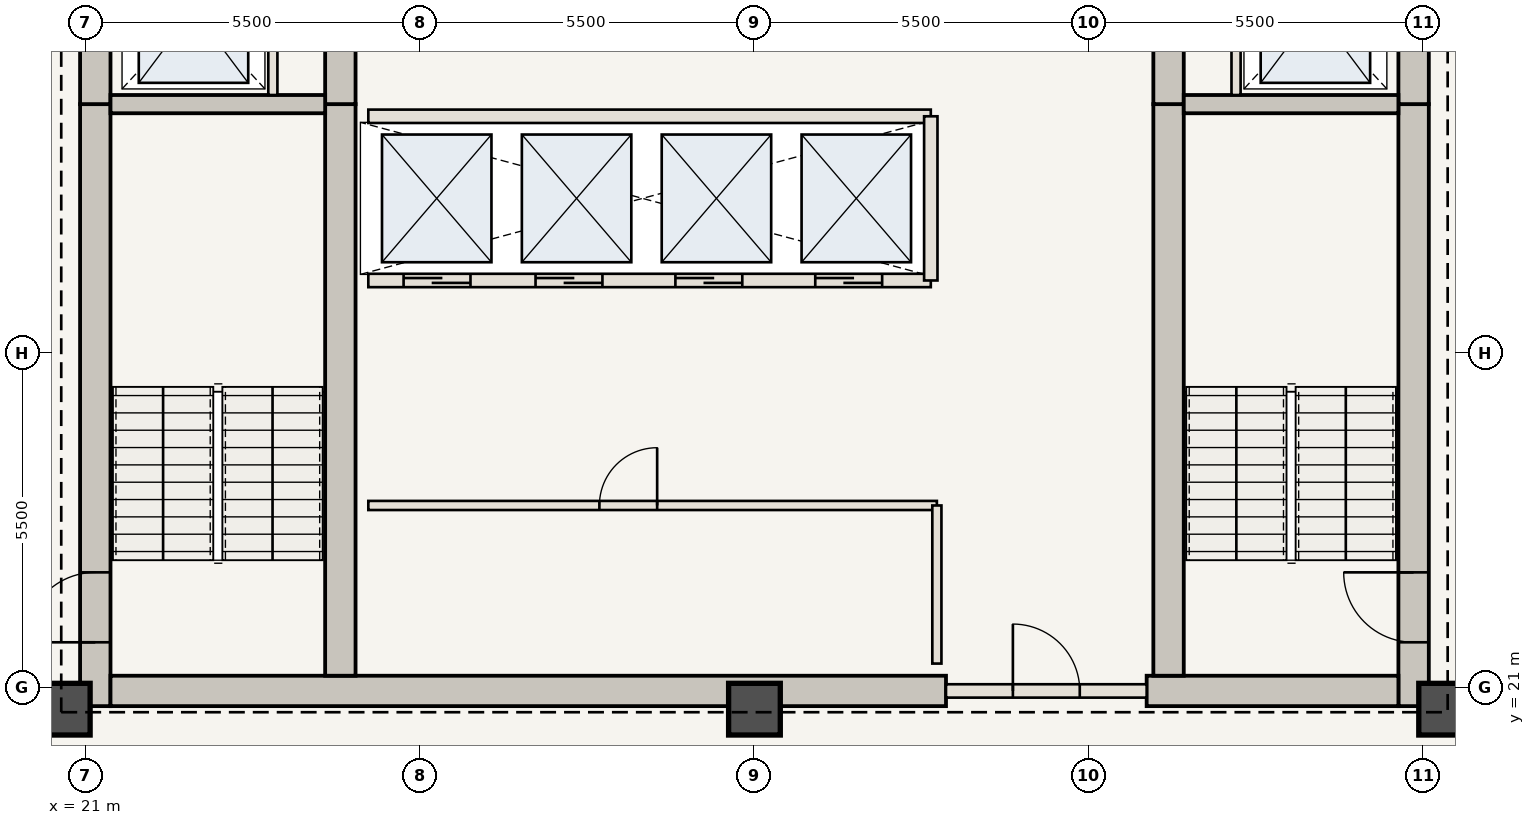
"""IFC4 building model, lengths in metres.
Left out: names, types, materials, properties, quantities, classifications, styles, units other than length and angle.
Written with IfcOpenShell. Run it as: python <this file> out.ifc"""

import sys

from ifc_helpers import new_model, si_unit, direction, frame, frame_2d, origin, origin_2d, place, context, subcontext, project, spatial, rectangle, extrude, element, fill, save


model = new_model("IFC4")
c1 = context("Model", 3, precision=1e-05, world=origin(), true_north=direction((0.0, 1.0)))
c2 = subcontext(c1, "Body", "Model", "MODEL_VIEW")
j1 = project(units=[si_unit("LENGTHUNIT", "METRE"), si_unit("PLANEANGLEUNIT", "RADIAN")], contexts=[c1])
p1 = place(None, origin())
s1 = spatial("IfcSite", under=j1, at=p1, CompositionType="ELEMENT")
p2 = place(p1, origin())
s2 = spatial("IfcBuilding", under=s1, at=p2, CompositionType="ELEMENT")
p3 = place(p2, frame((0.0, 0.0, 202.3)))
s3 = spatial("IfcBuildingStorey", under=s2, at=p3, CompositionType="ELEMENT", Elevation=202.3)
p4 = place(p3, frame((21.16, 20.7, 0.0), z_axis=(0.0, 0.0, 1.0), x_axis=(0.0, 1.0, 0.0)))
e1 = element("IfcWall", 1, at=p4, inside=s3, PredefinedType="SHEAR", context=c2, shape_type="SweptSolid", body=[
    extrude(rectangle(XDim=9.9, YDim=0.5, at=frame_2d((4.95, 0.0))), origin(), (0.0, 0.0, 1.0), 3.85),
])
p5 = place(p4, frame((1.05, 0.0, 0.0)))
e2 = element("IfcOpeningElement", 2, at=p5, cuts=e1, PredefinedType="OPENING", context=c2, shape_type="SweptSolid", body=[
    extrude(rectangle(XDim=1.15, YDim=2.15, at=frame_2d((0.575, 1.075))), frame((0.0, 0.26, 0.0), z_axis=(0.0, -1.0, 0.0), x_axis=(1.0, 0.0, 0.0)), (0.0, 0.0, 1.0), 0.52),
])
p6 = place(p3, frame((21.16, 30.6, 0.0), z_axis=(0.0, 0.0, 1.0), x_axis=(0.0, 1.0, 0.0)))
e3 = element("IfcWall", 3, at=p6, inside=s3, PredefinedType="SHEAR", context=c2, shape_type="SweptSolid", body=[
    extrude(rectangle(XDim=12.65, YDim=0.5, at=frame_2d((6.325, 0.0))), origin(), (0.0, 0.0, 1.0), 3.85),
])
p7 = place(p6, frame((4.2, 0.0, 0.0)))
e4 = element("IfcOpeningElement", 4, at=p7, cuts=e3, PredefinedType="OPENING", context=c2, shape_type="SweptSolid", body=[
    extrude(rectangle(XDim=1.1, YDim=2.15, at=frame_2d((0.55, 1.075))), frame((0.0, 0.26, 0.0), z_axis=(0.0, -1.0, 0.0), x_axis=(1.0, 0.0, 0.0)), (0.0, 0.0, 1.0), 0.52),
])
p8 = place(p6, frame((9.2, 0.0, 0.0)))
e5 = element("IfcOpeningElement", 5, at=p8, cuts=e3, PredefinedType="OPENING", context=c2, shape_type="SweptSolid", body=[
    extrude(rectangle(XDim=0.92, YDim=2.1, at=frame_2d((0.46, 1.05))), frame((0.0, 0.26, 0.0), z_axis=(0.0, -1.0, 0.0), x_axis=(1.0, 0.0, 0.0)), (0.0, 0.0, 1.0), 0.52),
])
p9 = place(p3, frame((42.84, 20.7, 0.0), z_axis=(0.0, 0.0, 1.0), x_axis=(0.0, 1.0, 0.0)))
e6 = element("IfcWall", 6, at=p9, inside=s3, PredefinedType="SHEAR", context=c2, shape_type="SweptSolid", body=[
    extrude(rectangle(XDim=9.9, YDim=0.5, at=frame_2d((4.95, 0.0))), origin(), (0.0, 0.0, 1.0), 3.85),
])
p10 = place(p9, frame((1.05, 0.0, 0.0)))
e7 = element("IfcOpeningElement", 7, at=p10, cuts=e6, PredefinedType="OPENING", context=c2, shape_type="SweptSolid", body=[
    extrude(rectangle(XDim=1.15, YDim=2.15, at=frame_2d((0.575, 1.075))), frame((0.0, 0.26, 0.0), z_axis=(0.0, -1.0, 0.0), x_axis=(1.0, 0.0, 0.0)), (0.0, 0.0, 1.0), 0.52),
])
p11 = place(p3, frame((42.84, 30.6, 0.0), z_axis=(0.0, 0.0, 1.0), x_axis=(0.0, 1.0, 0.0)))
e8 = element("IfcWall", 8, at=p11, inside=s3, PredefinedType="SHEAR", context=c2, shape_type="SweptSolid", body=[
    extrude(rectangle(XDim=12.65, YDim=0.5, at=frame_2d((6.325, 0.0))), origin(), (0.0, 0.0, 1.0), 3.85),
])
p12 = place(p11, frame((4.2, 0.0, 0.0)))
e9 = element("IfcOpeningElement", 9, at=p12, cuts=e8, PredefinedType="OPENING", context=c2, shape_type="SweptSolid", body=[
    extrude(rectangle(XDim=1.1, YDim=2.15, at=frame_2d((0.55, 1.075))), frame((0.0, 0.26, 0.0), z_axis=(0.0, -1.0, 0.0), x_axis=(1.0, 0.0, 0.0)), (0.0, 0.0, 1.0), 0.52),
])
p13 = place(p11, frame((8.05, 0.0, 0.0)))
e10 = element("IfcOpeningElement", 10, at=p13, cuts=e8, PredefinedType="OPENING", context=c2, shape_type="SweptSolid", body=[
    extrude(rectangle(XDim=0.88, YDim=2.1, at=frame_2d((0.44, 1.05))), frame((0.0, 0.26, 0.0), z_axis=(0.0, -1.0, 0.0), x_axis=(1.0, 0.0, 0.0)), (0.0, 0.0, 1.0), 0.52),
])
p14 = place(p11, frame((9.45, 0.0, 0.0)))
e11 = element("IfcOpeningElement", 11, at=p14, cuts=e8, PredefinedType="OPENING", context=c2, shape_type="SweptSolid", body=[
    extrude(rectangle(XDim=0.88, YDim=2.1, at=frame_2d((0.44, 1.05))), frame((0.0, 0.26, 0.0), z_axis=(0.0, -1.0, 0.0), x_axis=(1.0, 0.0, 0.0)), (0.0, 0.0, 1.0), 0.52),
])
p15 = place(p11, frame((10.85, 0.0, 0.0)))
e12 = element("IfcOpeningElement", 12, at=p15, cuts=e8, PredefinedType="OPENING", context=c2, shape_type="SweptSolid", body=[
    extrude(rectangle(XDim=0.88, YDim=2.1, at=frame_2d((0.44, 1.05))), frame((0.0, 0.26, 0.0), z_axis=(0.0, -1.0, 0.0), x_axis=(1.0, 0.0, 0.0)), (0.0, 0.0, 1.0), 0.52),
])
p16 = place(p3, frame((21.41, 20.95, 0.0), z_axis=(0.0, 0.0, 1.0), x_axis=(1.0, 0.0, 0.0)))
e13 = element("IfcWall", 13, at=p16, inside=s3, PredefinedType="SHEAR", context=c2, shape_type="SweptSolid", body=[
    extrude(rectangle(XDim=13.74, YDim=0.5, at=frame_2d((6.87, 0.0))), origin(), (0.0, 0.0, 1.0), 3.85),
])
p17 = place(p3, frame((38.45, 20.95, 0.0), z_axis=(0.0, 0.0, 1.0), x_axis=(1.0, 0.0, 0.0)))
e14 = element("IfcWall", 14, at=p17, inside=s3, PredefinedType="SHEAR", context=c2, shape_type="SweptSolid", body=[
    extrude(rectangle(XDim=4.14, YDim=0.5, at=frame_2d((2.07, 0.0))), origin(), (0.0, 0.0, 1.0), 3.85),
])
p18 = place(p3, frame((25.19, 21.2, 0.0), z_axis=(0.0, 0.0, 1.0), x_axis=(0.0, 1.0, 0.0)))
e15 = element("IfcWall", 15, at=p18, inside=s3, PredefinedType="SHEAR", context=c2, shape_type="SweptSolid", body=[
    extrude(rectangle(XDim=9.4, YDim=0.5, at=frame_2d((4.7, 0.0))), origin(), (0.0, 0.0, 1.0), 3.85),
])
p19 = place(p3, frame((25.19, 30.6, 0.0), z_axis=(0.0, 0.0, 1.0), x_axis=(0.0, 1.0, 0.0)))
e16 = element("IfcWall", 16, at=p19, inside=s3, PredefinedType="SHEAR", context=c2, shape_type="SweptSolid", body=[
    extrude(rectangle(XDim=12.15, YDim=0.5, at=frame_2d((6.075, 0.0))), origin(), (0.0, 0.0, 1.0), 3.85),
])
p20 = place(p19, frame((6.25, 0.0, 0.0)))
e17 = element("IfcOpeningElement", 17, at=p20, cuts=e16, PredefinedType="OPENING", context=c2, shape_type="SweptSolid", body=[
    extrude(rectangle(XDim=1.1, YDim=2.15, at=frame_2d((0.55, 1.075))), frame((0.0, 0.26, 0.0), z_axis=(0.0, -1.0, 0.0), x_axis=(1.0, 0.0, 0.0)), (0.0, 0.0, 1.0), 0.52),
])
p21 = place(p3, frame((38.81, 21.2, 0.0), z_axis=(0.0, 0.0, 1.0), x_axis=(0.0, 1.0, 0.0)))
e18 = element("IfcWall", 18, at=p21, inside=s3, PredefinedType="SHEAR", context=c2, shape_type="SweptSolid", body=[
    extrude(rectangle(XDim=9.4, YDim=0.5, at=frame_2d((4.7, 0.0))), origin(), (0.0, 0.0, 1.0), 3.85),
])
p22 = place(p3, frame((38.81, 30.6, 0.0), z_axis=(0.0, 0.0, 1.0), x_axis=(0.0, 1.0, 0.0)))
e19 = element("IfcWall", 19, at=p22, inside=s3, PredefinedType="SHEAR", context=c2, shape_type="SweptSolid", body=[
    extrude(rectangle(XDim=12.15, YDim=0.5, at=frame_2d((6.075, 0.0))), origin(), (0.0, 0.0, 1.0), 3.85),
])
for number, where, z_axis, x_axis in (
    (20, (20.65, 20.65, 0.0), (0.0, 0.0, 1.0), (1.0, 0.0, 0.0)),
    (21, (32.0, 20.65, 0.0), (0.0, 0.0, 1.0), (1.0, 0.0, 0.0)),
    (22, (43.35, 20.65, 0.0), (0.0, 0.0, 1.0), (1.0, 0.0, 0.0)),
):
    element("IfcColumn", number, at=place(p3, frame(where, z_axis=z_axis, x_axis=x_axis)), inside=s3, PredefinedType="COLUMN", context=c2, shape_type="SweptSolid", body=[
        extrude(rectangle(XDim=0.85, YDim=0.85, at=origin_2d()), origin(), (0.0, 0.0, 1.0), 3.85),
    ])
for number, where, z_axis, x_axis in (
    (23, (21.41, 30.6, 0.0), (0.0, 0.0, 1.0), (1.0, 0.0, 0.0)),
    (24, (39.06, 30.6, 0.0), (0.0, 0.0, 1.0), (1.0, 0.0, 0.0)),
):
    element("IfcWall", number, at=place(p3, frame(where, z_axis=z_axis, x_axis=x_axis)), inside=s3, PredefinedType="SHEAR", context=c2, shape_type="SweptSolid", body=[
        extrude(rectangle(XDim=3.53, YDim=0.3, at=frame_2d((1.765, 0.0))), origin(), (0.0, 0.0, 1.0), 3.685),
    ])
for number, where, z_axis, x_axis in (
    (25, (24.08, 30.75, 0.0), (0.0, 0.0, 1.0), (0.0, 1.0, 0.0)),
    (26, (39.92, 30.75, 0.0), (0.0, 0.0, 1.0), (0.0, 1.0, 0.0)),
):
    element("IfcWall", number, at=place(p3, frame(where, z_axis=z_axis, x_axis=x_axis)), inside=s3, PredefinedType="STANDARD", context=c2, shape_type="SweptSolid", body=[
        extrude(rectangle(XDim=2.65, YDim=0.15, at=frame_2d((1.325, 0.0))), origin(), (0.0, 0.0, 1.0), 3.685),
    ])
p23 = place(p3, frame((35.15, 20.95, 0.0), z_axis=(0.0, 0.0, 1.0), x_axis=(1.0, 0.0, 0.0)))
e27 = element("IfcWall", 27, at=p23, inside=s3, PredefinedType="STANDARD", context=c2, shape_type="SweptSolid", body=[
    extrude(rectangle(XDim=3.3, YDim=0.22, at=frame_2d((1.65, 0.0))), origin(), (0.0, 0.0, 1.0), 3.685),
])
p24 = place(p23, frame((1.1, 0.0, 0.0)))
e28 = element("IfcOpeningElement", 28, at=p24, cuts=e27, PredefinedType="OPENING", context=c2, shape_type="SweptSolid", body=[
    extrude(rectangle(XDim=1.1, YDim=2.15, at=frame_2d((0.55, 1.075))), frame((0.0, 0.12, 0.0), z_axis=(0.0, -1.0, 0.0), x_axis=(1.0, 0.0, 0.0)), (0.0, 0.0, 1.0), 0.24),
])
p25 = place(p3, frame((25.65, 24.0, 0.0), z_axis=(0.0, 0.0, 1.0), x_axis=(1.0, 0.0, 0.0)))
e29 = element("IfcWall", 29, at=p25, inside=s3, PredefinedType="STANDARD", context=c2, shape_type="SweptSolid", body=[
    extrude(rectangle(XDim=9.35, YDim=0.15, at=frame_2d((4.675, 0.0))), origin(), (0.0, 0.0, 1.0), 3.685),
])
p26 = place(p25, frame((3.8, 0.0, 0.0)))
e30 = element("IfcOpeningElement", 30, at=p26, cuts=e29, PredefinedType="OPENING", context=c2, shape_type="SweptSolid", body=[
    extrude(rectangle(XDim=0.95, YDim=2.15, at=frame_2d((0.475, 1.075))), frame((0.0, 0.085, 0.0), z_axis=(0.0, -1.0, 0.0), x_axis=(1.0, 0.0, 0.0)), (0.0, 0.0, 1.0), 0.17),
])
p27 = place(p3, frame((35.0, 21.4, 0.0), z_axis=(0.0, 0.0, 1.0), x_axis=(0.0, 1.0, 0.0)))
e31 = element("IfcWall", 31, at=p27, inside=s3, PredefinedType="STANDARD", context=c2, shape_type="SweptSolid", body=[
    extrude(rectangle(XDim=2.6, YDim=0.15, at=frame_2d((1.3, 0.0))), origin(), (0.0, 0.0, 1.0), 3.685),
])
p28 = place(p3, frame((25.65, 27.7, 0.0), z_axis=(0.0, 0.0, 1.0), x_axis=(1.0, 0.0, 0.0)))
e32 = element("IfcWall", 32, at=p28, inside=s3, PredefinedType="STANDARD", context=c2, shape_type="SweptSolid", body=[
    extrude(rectangle(XDim=9.25, YDim=0.22, at=frame_2d((4.625, 0.0))), origin(), (0.0, 0.0, 1.0), 3.685),
])
p29 = place(p28, frame((0.58, 0.0, 0.0)))
e33 = element("IfcOpeningElement", 33, at=p29, cuts=e32, PredefinedType="OPENING", context=c2, shape_type="SweptSolid", body=[
    extrude(rectangle(XDim=1.1, YDim=2.15, at=frame_2d((0.55, 1.075))), frame((0.0, 0.12, 0.0), z_axis=(0.0, -1.0, 0.0), x_axis=(1.0, 0.0, 0.0)), (0.0, 0.0, 1.0), 0.24),
])
p30 = place(p28, frame((2.75, 0.0, 0.0)))
e34 = element("IfcOpeningElement", 34, at=p30, cuts=e32, PredefinedType="OPENING", context=c2, shape_type="SweptSolid", body=[
    extrude(rectangle(XDim=1.1, YDim=2.15, at=frame_2d((0.55, 1.075))), frame((0.0, 0.12, 0.0), z_axis=(0.0, -1.0, 0.0), x_axis=(1.0, 0.0, 0.0)), (0.0, 0.0, 1.0), 0.24),
])
p31 = place(p28, frame((5.05, 0.0, 0.0)))
e35 = element("IfcOpeningElement", 35, at=p31, cuts=e32, PredefinedType="OPENING", context=c2, shape_type="SweptSolid", body=[
    extrude(rectangle(XDim=1.1, YDim=2.15, at=frame_2d((0.55, 1.075))), frame((0.0, 0.12, 0.0), z_axis=(0.0, -1.0, 0.0), x_axis=(1.0, 0.0, 0.0)), (0.0, 0.0, 1.0), 0.24),
])
p32 = place(p28, frame((7.35, 0.0, 0.0)))
e36 = element("IfcOpeningElement", 36, at=p32, cuts=e32, PredefinedType="OPENING", context=c2, shape_type="SweptSolid", body=[
    extrude(rectangle(XDim=1.1, YDim=2.15, at=frame_2d((0.55, 1.075))), frame((0.0, 0.12, 0.0), z_axis=(0.0, -1.0, 0.0), x_axis=(1.0, 0.0, 0.0)), (0.0, 0.0, 1.0), 0.24),
])
p33 = place(p3, frame((25.65, 30.4, 0.0), z_axis=(0.0, 0.0, 1.0), x_axis=(1.0, 0.0, 0.0)))
e37 = element("IfcWall", 37, at=p33, inside=s3, PredefinedType="STANDARD", context=c2, shape_type="SweptSolid", body=[
    extrude(rectangle(XDim=9.25, YDim=0.22, at=frame_2d((4.625, 0.0))), origin(), (0.0, 0.0, 1.0), 3.685),
])
p34 = place(p3, frame((34.9, 27.7, 0.0), z_axis=(0.0, 0.0, 1.0), x_axis=(0.0, 1.0, 0.0)))
e38 = element("IfcWall", 38, at=p34, inside=s3, PredefinedType="STANDARD", context=c2, shape_type="SweptSolid", body=[
    extrude(rectangle(XDim=2.7, YDim=0.22, at=frame_2d((1.35, 0.0))), origin(), (0.0, 0.0, 1.0), 3.685),
])
p35 = place(p5, origin())
e39 = element("IfcDoor", 39, at=p35, inside=s3, OperationType="SINGLE_SWING_LEFT", PredefinedType="DOOR", context=c2, shape_type="SweptSolid", body=[
    extrude(rectangle(XDim=1.15, YDim=2.15, at=frame_2d((0.575, 1.075))), frame((0.0, 0.025, 0.0), z_axis=(0.0, -1.0, 0.0), x_axis=(1.0, 0.0, 0.0)), (0.0, 0.0, 1.0), 0.05),
])
fill(e2, e39)
p36 = place(p10, origin())
e40 = element("IfcDoor", 40, at=p36, inside=s3, OperationType="SINGLE_SWING_RIGHT", PredefinedType="DOOR", context=c2, shape_type="SweptSolid", body=[
    extrude(rectangle(XDim=1.15, YDim=2.15, at=frame_2d((0.575, 1.075))), frame((0.0, 0.025, 0.0), z_axis=(0.0, -1.0, 0.0), x_axis=(1.0, 0.0, 0.0)), (0.0, 0.0, 1.0), 0.05),
])
fill(e7, e40)
p37 = place(p24, origin())
e41 = element("IfcDoor", 41, at=p37, inside=s3, OperationType="SINGLE_SWING_LEFT", PredefinedType="DOOR", context=c2, shape_type="SweptSolid", body=[
    extrude(rectangle(XDim=1.1, YDim=2.15, at=frame_2d((0.55, 1.075))), frame((0.0, 0.025, 0.0), z_axis=(0.0, -1.0, 0.0), x_axis=(1.0, 0.0, 0.0)), (0.0, 0.0, 1.0), 0.05),
])
fill(e28, e41)
p38 = place(p26, origin())
e42 = element("IfcDoor", 42, at=p38, inside=s3, OperationType="SINGLE_SWING_RIGHT", PredefinedType="DOOR", context=c2, shape_type="SweptSolid", body=[
    extrude(rectangle(XDim=0.95, YDim=2.15, at=frame_2d((0.475, 1.075))), frame((0.0, 0.025, 0.0), z_axis=(0.0, -1.0, 0.0), x_axis=(1.0, 0.0, 0.0)), (0.0, 0.0, 1.0), 0.05),
])
fill(e30, e42)
p39 = place(p29, origin())
e43 = element("IfcDoor", 43, at=p39, inside=s3, OperationType="DOUBLE_DOOR_SLIDING", PredefinedType="DOOR", context=c2, shape_type="SweptSolid", body=[
    extrude(rectangle(XDim=1.1, YDim=2.15, at=frame_2d((0.55, 1.075))), frame((0.0, 0.025, 0.0), z_axis=(0.0, -1.0, 0.0), x_axis=(1.0, 0.0, 0.0)), (0.0, 0.0, 1.0), 0.05),
])
fill(e33, e43)
p40 = place(p30, origin())
e44 = element("IfcDoor", 44, at=p40, inside=s3, OperationType="DOUBLE_DOOR_SLIDING", PredefinedType="DOOR", context=c2, shape_type="SweptSolid", body=[
    extrude(rectangle(XDim=1.1, YDim=2.15, at=frame_2d((0.55, 1.075))), frame((0.0, 0.025, 0.0), z_axis=(0.0, -1.0, 0.0), x_axis=(1.0, 0.0, 0.0)), (0.0, 0.0, 1.0), 0.05),
])
fill(e34, e44)
p41 = place(p31, origin())
e45 = element("IfcDoor", 45, at=p41, inside=s3, OperationType="DOUBLE_DOOR_SLIDING", PredefinedType="DOOR", context=c2, shape_type="SweptSolid", body=[
    extrude(rectangle(XDim=1.1, YDim=2.15, at=frame_2d((0.55, 1.075))), frame((0.0, 0.025, 0.0), z_axis=(0.0, -1.0, 0.0), x_axis=(1.0, 0.0, 0.0)), (0.0, 0.0, 1.0), 0.05),
])
fill(e35, e45)
p42 = place(p32, origin())
e46 = element("IfcDoor", 46, at=p42, inside=s3, OperationType="DOUBLE_DOOR_SLIDING", PredefinedType="DOOR", context=c2, shape_type="SweptSolid", body=[
    extrude(rectangle(XDim=1.1, YDim=2.15, at=frame_2d((0.55, 1.075))), frame((0.0, 0.025, 0.0), z_axis=(0.0, -1.0, 0.0), x_axis=(1.0, 0.0, 0.0)), (0.0, 0.0, 1.0), 0.05),
])
fill(e36, e46)
save(model, sys.argv[1])
